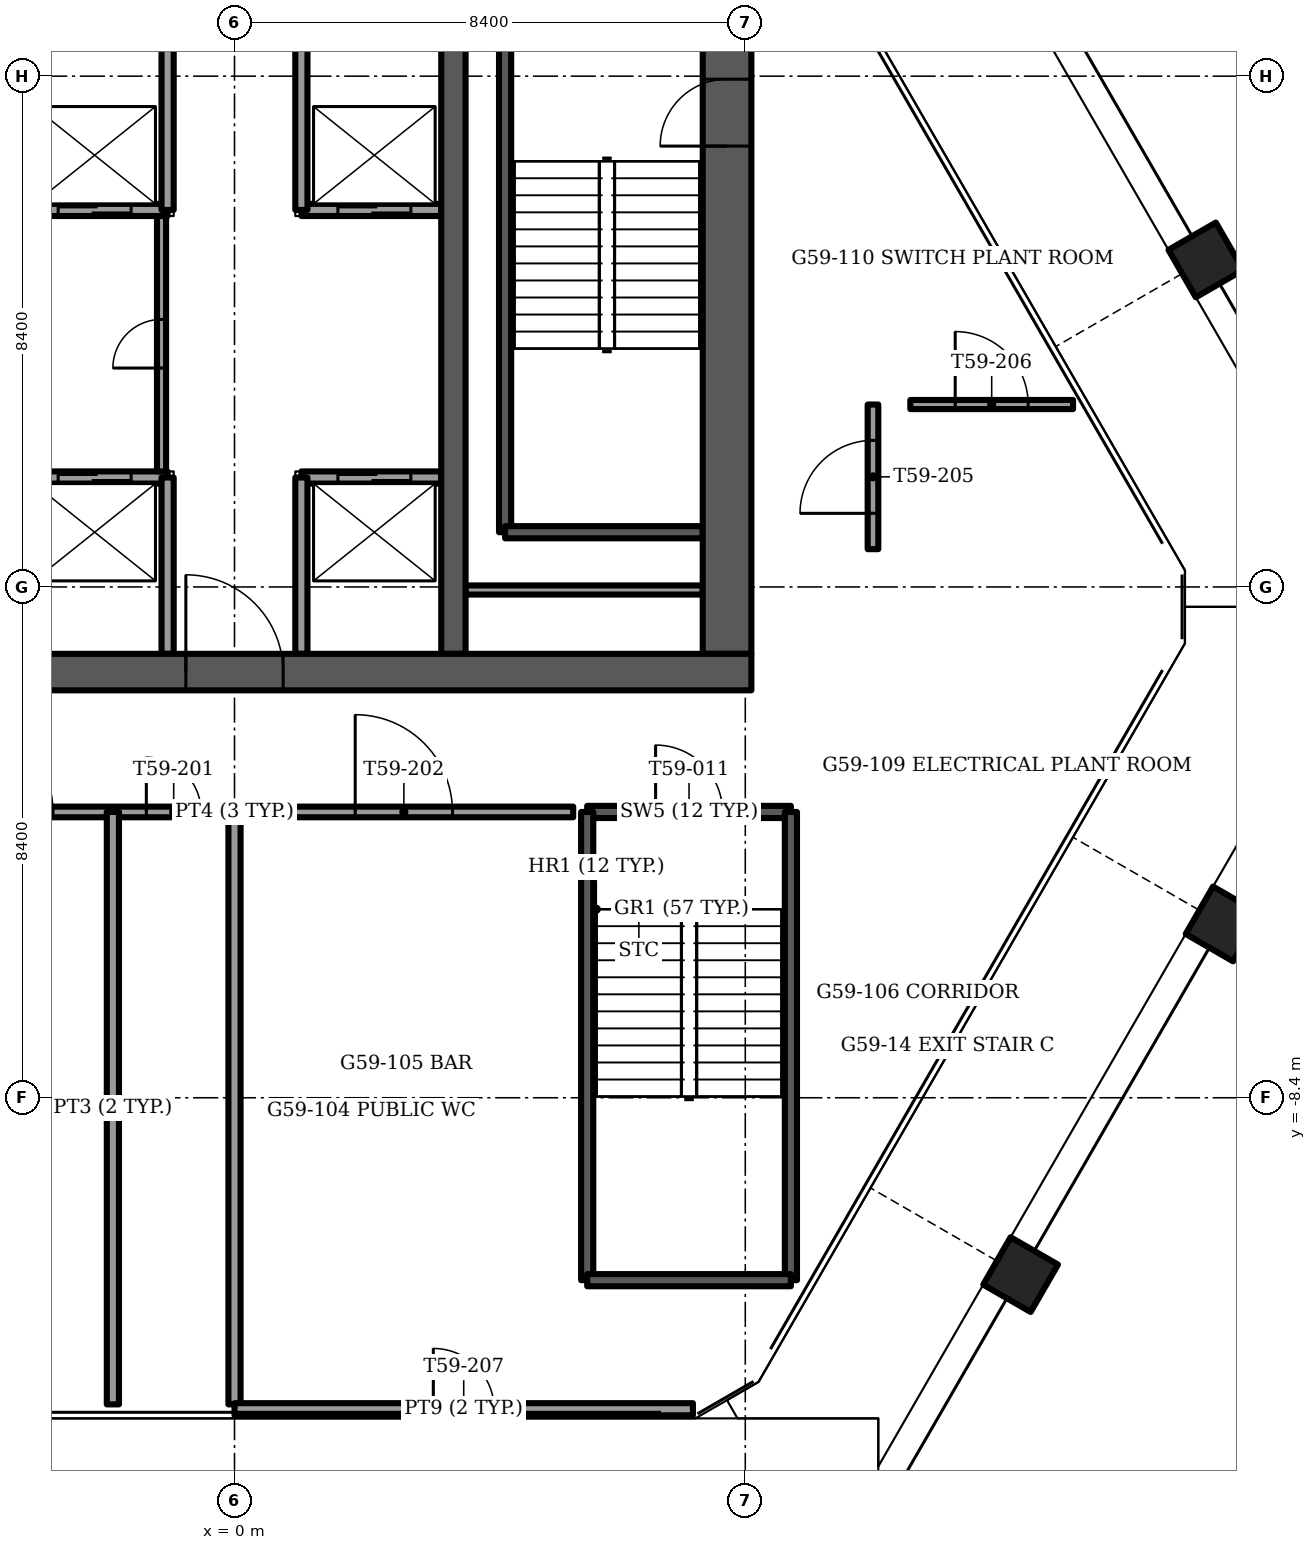
"""IFC4 building model, lengths in metres.
Left out: names, types, materials, properties, quantities, classifications, styles, units other than length and angle.
Written with IfcOpenShell. Run it as: python <this file> out.ifc"""

import sys

from ifc_helpers import new_model, si_unit, direction, frame, frame_2d, origin, origin_2d, place, context, subcontext, project, spatial, rectangle, extrude, element, fill, save


model = new_model("IFC4")
c1 = context("Model", 3, precision=1e-05, world=origin(), true_north=direction((0.0, 1.0)))
c2 = subcontext(c1, "Body", "Model", "MODEL_VIEW")
j1 = project(units=[si_unit("LENGTHUNIT", "METRE"), si_unit("PLANEANGLEUNIT", "RADIAN")], contexts=[c1])
p1 = place(None, origin())
s1 = spatial("IfcSite", under=j1, at=p1, CompositionType="ELEMENT")
p2 = place(p1, origin())
s2 = spatial("IfcBuilding", under=s1, at=p2, CompositionType="ELEMENT")
p3 = place(p2, frame((0.0, 0.0, 237.0)))
s3 = spatial("IfcBuildingStorey", under=s2, at=p3, CompositionType="ELEMENT", Elevation=237.0)
for number, where, z_axis, x_axis in (
    (1, (12.928, -11.308, -1.2), (0.0, 0.0, 1.0), (-0.5, -0.866, 0.0)),
    (2, (16.257, -5.542, -1.2), (0.0, 0.0, 1.0), (-0.5, -0.866, 0.0)),
    (3, (15.974, 5.378, -1.2), (0.0, 0.0, 1.0), (0.5, -0.866, 0.0)),
):
    element("IfcColumn", number, at=place(p3, frame(where, z_axis=z_axis, x_axis=x_axis)), inside=s3, PredefinedType="COLUMN", context=c2, shape_type="SweptSolid", body=[
        extrude(rectangle(XDim=0.9, YDim=0.9, at=origin_2d()), origin(), (0.0, 0.0, 1.0), 8.0),
    ])
p4 = place(p3, frame((-8.5, -1.4, -0.3), z_axis=(0.0, 0.0, 1.0), x_axis=(1.0, 0.0, 0.0)))
e4 = element("IfcWall", 4, at=p4, inside=s3, PredefinedType="SHEAR", context=c2, shape_type="SweptSolid", body=[
    extrude(rectangle(XDim=17.0, YDim=0.6, at=frame_2d((8.5, 0.0))), origin(), (0.0, 0.0, 1.0), 8.0),
])
p5 = place(p4, frame((7.7, 0.0, 0.0)))
e5 = element("IfcOpeningElement", 5, at=p5, cuts=e4, PredefinedType="OPENING", context=c2, shape_type="SweptSolid", body=[
    extrude(rectangle(XDim=1.6, YDim=2.1, at=frame_2d((0.8, 1.05))), frame((0.0, 0.3, 0.0), z_axis=(0.0, -1.0, 0.0), x_axis=(1.0, 0.0, 0.0)), (0.0, 0.0, 1.0), 0.6),
])
p6 = place(p3, frame((8.1, -1.1, -0.3), z_axis=(0.0, 0.0, 1.0), x_axis=(0.0, 1.0, 0.0)))
e6 = element("IfcWall", 6, at=p6, inside=s3, PredefinedType="SHEAR", context=c2, shape_type="SweptSolid", body=[
    extrude(rectangle(XDim=10.2, YDim=0.8, at=frame_2d((5.1, 0.0))), origin(), (0.0, 0.0, 1.0), 8.0),
])
p7 = place(p6, frame((8.35, 0.0, 0.0)))
e7 = element("IfcOpeningElement", 7, at=p7, cuts=e6, PredefinedType="OPENING", context=c2, shape_type="SweptSolid", body=[
    extrude(rectangle(XDim=1.1, YDim=2.1, at=frame_2d((0.55, 1.05))), frame((0.0, 0.4, 0.0), z_axis=(0.0, -1.0, 0.0), x_axis=(1.0, 0.0, 0.0)), (0.0, 0.0, 1.0), 0.8),
])
p8 = place(p3, frame((3.6, -1.1, -0.3), z_axis=(0.0, 0.0, 1.0), x_axis=(0.0, 1.0, 0.0)))
e8 = element("IfcWall", 8, at=p8, inside=s3, PredefinedType="SHEAR", context=c2, shape_type="SweptSolid", body=[
    extrude(rectangle(XDim=10.2, YDim=0.4, at=frame_2d((5.1, 0.0))), origin(), (0.0, 0.0, 1.0), 8.0),
])
p9 = place(p3, frame((-3.4, 1.8, 0.0), z_axis=(0.0, 0.0, 1.0), x_axis=(1.0, 0.0, 0.0)))
e9 = element("IfcWall", 9, at=p9, inside=s3, PredefinedType="PARTITIONING", context=c2, shape_type="SweptSolid", body=[
    extrude(rectangle(XDim=2.3, YDim=0.2, at=frame_2d((1.15, 0.0))), origin(), (0.0, 0.0, 1.0), 7.7),
])
p10 = place(p9, frame((0.5, 0.0, 0.0)))
e10 = element("IfcOpeningElement", 10, at=p10, cuts=e9, PredefinedType="OPENING", context=c2, shape_type="SweptSolid", body=[
    extrude(rectangle(XDim=1.2, YDim=2.1, at=frame_2d((0.6, 1.05))), frame((0.0, 0.1, 0.0), z_axis=(0.0, -1.0, 0.0), x_axis=(1.0, 0.0, 0.0)), (0.0, 0.0, 1.0), 0.2),
])
p11 = place(p3, frame((-3.4, 6.2, 0.0), z_axis=(0.0, 0.0, 1.0), x_axis=(1.0, 0.0, 0.0)))
e11 = element("IfcWall", 11, at=p11, inside=s3, PredefinedType="PARTITIONING", context=c2, shape_type="SweptSolid", body=[
    extrude(rectangle(XDim=2.3, YDim=0.2, at=frame_2d((1.15, 0.0))), origin(), (0.0, 0.0, 1.0), 7.7),
])
p12 = place(p11, frame((0.5, 0.0, 0.0)))
e12 = element("IfcOpeningElement", 12, at=p12, cuts=e11, PredefinedType="OPENING", context=c2, shape_type="SweptSolid", body=[
    extrude(rectangle(XDim=1.2, YDim=2.1, at=frame_2d((0.6, 1.05))), frame((0.0, 0.1, 0.0), z_axis=(0.0, -1.0, 0.0), x_axis=(1.0, 0.0, 0.0)), (0.0, 0.0, 1.0), 0.2),
])
p13 = place(p3, frame((1.1, 1.8, 0.0), z_axis=(0.0, 0.0, 1.0), x_axis=(1.0, 0.0, 0.0)))
e13 = element("IfcWall", 13, at=p13, inside=s3, PredefinedType="PARTITIONING", context=c2, shape_type="SweptSolid", body=[
    extrude(rectangle(XDim=2.3, YDim=0.2, at=frame_2d((1.15, 0.0))), origin(), (0.0, 0.0, 1.0), 7.7),
])
p14 = place(p13, frame((0.6, 0.0, 0.0)))
e14 = element("IfcOpeningElement", 14, at=p14, cuts=e13, PredefinedType="OPENING", context=c2, shape_type="SweptSolid", body=[
    extrude(rectangle(XDim=1.2, YDim=2.1, at=frame_2d((0.6, 1.05))), frame((0.0, 0.1, 0.0), z_axis=(0.0, -1.0, 0.0), x_axis=(1.0, 0.0, 0.0)), (0.0, 0.0, 1.0), 0.2),
])
p15 = place(p3, frame((1.1, 6.2, 0.0), z_axis=(0.0, 0.0, 1.0), x_axis=(1.0, 0.0, 0.0)))
e15 = element("IfcWall", 15, at=p15, inside=s3, PredefinedType="PARTITIONING", context=c2, shape_type="SweptSolid", body=[
    extrude(rectangle(XDim=2.3, YDim=0.2, at=frame_2d((1.15, 0.0))), origin(), (0.0, 0.0, 1.0), 7.7),
])
p16 = place(p15, frame((0.6, 0.0, 0.0)))
e16 = element("IfcOpeningElement", 16, at=p16, cuts=e15, PredefinedType="OPENING", context=c2, shape_type="SweptSolid", body=[
    extrude(rectangle(XDim=1.2, YDim=2.1, at=frame_2d((0.6, 1.05))), frame((0.0, 0.1, 0.0), z_axis=(0.0, -1.0, 0.0), x_axis=(1.0, 0.0, 0.0)), (0.0, 0.0, 1.0), 0.2),
])
for number, where, z_axis, x_axis in (
    (17, (-1.1, -1.1, 0.0), (0.0, 0.0, 1.0), (0.0, 1.0, 0.0)),
    (18, (1.1, -1.1, 0.0), (0.0, 0.0, 1.0), (0.0, 1.0, 0.0)),
    (19, (-1.1, 6.2, 0.0), (0.0, 0.0, 1.0), (0.0, 1.0, 0.0)),
    (20, (1.1, 6.2, 0.0), (0.0, 0.0, 1.0), (0.0, 1.0, 0.0)),
):
    element("IfcWall", number, at=place(p3, frame(where, z_axis=z_axis, x_axis=x_axis)), inside=s3, PredefinedType="PARTITIONING", context=c2, shape_type="SweptSolid", body=[
        extrude(rectangle(XDim=2.9, YDim=0.2, at=frame_2d((1.45, 0.0))), origin(), (0.0, 0.0, 1.0), 7.7),
    ])
p17 = place(p3, frame((4.45, 0.9, -0.3), z_axis=(0.0, 0.0, 1.0), x_axis=(0.0, 1.0, 0.0)))
e21 = element("IfcWall", 21, at=p17, inside=s3, PredefinedType="SOLIDWALL", context=c2, shape_type="SweptSolid", body=[
    extrude(rectangle(XDim=8.2, YDim=0.2, at=frame_2d((4.1, 0.0))), origin(), (0.0, 0.0, 1.0), 8.0),
])
p18 = place(p3, frame((4.45, 0.9, -0.3), z_axis=(0.0, 0.0, 1.0), x_axis=(1.0, 0.0, 0.0)))
e22 = element("IfcWall", 22, at=p18, inside=s3, PredefinedType="SOLIDWALL", context=c2, shape_type="SweptSolid", body=[
    extrude(rectangle(XDim=3.25, YDim=0.2, at=frame_2d((1.625, 0.0))), origin(), (0.0, 0.0, 1.0), 8.0),
])
p19 = place(p3, frame((3.8, -0.05, 0.0), z_axis=(0.0, 0.0, 1.0), x_axis=(1.0, 0.0, 0.0)))
e23 = element("IfcWall", 23, at=p19, inside=s3, PredefinedType="PARTITIONING", context=c2, shape_type="SweptSolid", body=[
    extrude(rectangle(XDim=3.9, YDim=0.15, at=frame_2d((1.95, 0.0))), origin(), (0.0, 0.0, 1.0), 7.7),
])
p20 = place(p3, frame((5.8, -3.7, -0.3), z_axis=(0.0, 0.0, 1.0), x_axis=(1.0, 0.0, 0.0)))
e24 = element("IfcWall", 24, at=p20, inside=s3, PredefinedType="SOLIDWALL", context=c2, shape_type="SweptSolid", body=[
    extrude(rectangle(XDim=3.35, YDim=0.2, at=frame_2d((1.675, 0.0))), origin(), (0.0, 0.0, 1.0), 8.0),
])
p21 = place(p20, frame((1.125, 0.0, 0.0)))
e25 = element("IfcOpeningElement", 25, at=p21, cuts=e24, PredefinedType="OPENING", context=c2, shape_type="SweptSolid", body=[
    extrude(rectangle(XDim=1.1, YDim=2.1, at=frame_2d((0.55, 1.05))), frame((0.0, 0.1, 0.0), z_axis=(0.0, -1.0, 0.0), x_axis=(1.0, 0.0, 0.0)), (0.0, 0.0, 1.0), 0.2),
])
for number, where, z_axis, x_axis in (
    (26, (5.8, -3.7, -0.3), (0.0, 0.0, 1.0), (0.0, -1.0, 0.0)),
    (27, (9.15, -3.7, -0.3), (0.0, 0.0, 1.0), (0.0, -1.0, 0.0)),
):
    element("IfcWall", number, at=place(p3, frame(where, z_axis=z_axis, x_axis=x_axis)), inside=s3, PredefinedType="SOLIDWALL", context=c2, shape_type="SweptSolid", body=[
        extrude(rectangle(XDim=7.7, YDim=0.2, at=frame_2d((3.85, 0.0))), origin(), (0.0, 0.0, 1.0), 8.0),
    ])
p22 = place(p3, frame((5.8, -11.4, -0.3), z_axis=(0.0, 0.0, 1.0), x_axis=(1.0, 0.0, 0.0)))
e28 = element("IfcWall", 28, at=p22, inside=s3, PredefinedType="SOLIDWALL", context=c2, shape_type="SweptSolid", body=[
    extrude(rectangle(XDim=3.35, YDim=0.2, at=frame_2d((1.675, 0.0))), origin(), (0.0, 0.0, 1.0), 8.0),
])
p23 = place(p3, frame((-1.2, 1.9, 0.0), z_axis=(0.0, 0.0, 1.0), x_axis=(0.0, 1.0, 0.0)))
e29 = element("IfcWall", 29, at=p23, inside=s3, PredefinedType="PARTITIONING", context=c2, shape_type="SweptSolid", body=[
    extrude(rectangle(XDim=4.2, YDim=0.15, at=frame_2d((2.1, 0.0))), origin(), (0.0, 0.0, 1.0), 7.7),
])
p24 = place(p23, frame((1.7, 0.0, 0.0)))
e30 = element("IfcOpeningElement", 30, at=p24, cuts=e29, PredefinedType="OPENING", context=c2, shape_type="SweptSolid", body=[
    extrude(rectangle(XDim=0.8, YDim=2.1, at=frame_2d((0.4, 1.05))), frame((0.0, 0.075, 0.0), z_axis=(0.0, -1.0, 0.0), x_axis=(1.0, 0.0, 0.0)), (0.0, 0.0, 1.0), 0.15),
])
p25 = place(p3, frame((-5.57, -3.7, 0.0), z_axis=(0.0, 0.0, 1.0), x_axis=(1.0, 0.0, 0.0)))
e31 = element("IfcWall", 31, at=p25, inside=s3, PredefinedType="PARTITIONING", context=c2, shape_type="SweptSolid", body=[
    extrude(rectangle(XDim=11.14, YDim=0.175, at=frame_2d((5.57, 0.0))), origin(), (0.0, 0.0, 1.0), 7.7),
])
p26 = place(p25, frame((0.985, 0.0, 0.0)))
e32 = element("IfcOpeningElement", 32, at=p26, cuts=e31, PredefinedType="OPENING", context=c2, shape_type="SweptSolid", body=[
    extrude(rectangle(XDim=1.6, YDim=2.1, at=frame_2d((0.8, 1.05))), frame((0.0, 0.087, 0.0), z_axis=(0.0, -1.0, 0.0), x_axis=(1.0, 0.0, 0.0)), (0.0, 0.0, 1.0), 0.175),
])
p27 = place(p25, frame((4.12, 0.0, 0.0)))
e33 = element("IfcOpeningElement", 33, at=p27, cuts=e31, PredefinedType="OPENING", context=c2, shape_type="SweptSolid", body=[
    extrude(rectangle(XDim=0.9, YDim=2.1, at=frame_2d((0.45, 1.05))), frame((0.0, 0.087, 0.0), z_axis=(0.0, -1.0, 0.0), x_axis=(1.0, 0.0, 0.0)), (0.0, 0.0, 1.0), 0.175),
])
p28 = place(p25, frame((7.555, 0.0, 0.0)))
e34 = element("IfcOpeningElement", 34, at=p28, cuts=e31, PredefinedType="OPENING", context=c2, shape_type="SweptSolid", body=[
    extrude(rectangle(XDim=1.6, YDim=2.1, at=frame_2d((0.8, 1.05))), frame((0.0, 0.087, 0.0), z_axis=(0.0, -1.0, 0.0), x_axis=(1.0, 0.0, 0.0)), (0.0, 0.0, 1.0), 0.175),
])
p29 = place(p3, frame((10.5, 0.621, 0.0), z_axis=(0.0, 0.0, 1.0), x_axis=(0.0, 1.0, 0.0)))
e35 = element("IfcWall", 35, at=p29, inside=s3, PredefinedType="PARTITIONING", context=c2, shape_type="SweptSolid", body=[
    extrude(rectangle(XDim=2.379, YDim=0.175, at=frame_2d((1.189, 0.0))), origin(), (0.0, 0.0, 1.0), 7.7),
])
p30 = place(p29, frame((0.589, 0.0, 0.0)))
e36 = element("IfcOpeningElement", 36, at=p30, cuts=e35, PredefinedType="OPENING", context=c2, shape_type="SweptSolid", body=[
    extrude(rectangle(XDim=1.2, YDim=2.1, at=frame_2d((0.6, 1.05))), frame((0.0, 0.087, 0.0), z_axis=(0.0, -1.0, 0.0), x_axis=(1.0, 0.0, 0.0)), (0.0, 0.0, 1.0), 0.175),
])
p31 = place(p3, frame((-2.0, -13.443, 0.0), z_axis=(0.0, 0.0, 1.0), x_axis=(0.0, 1.0, 0.0)))
e37 = element("IfcWall", 37, at=p31, inside=s3, PredefinedType="PARTITIONING", context=c2, shape_type="SweptSolid", body=[
    extrude(rectangle(XDim=9.743, YDim=0.2, at=frame_2d((4.871, 0.0))), origin(), (0.0, 0.0, 1.0), 7.7),
])
p32 = place(p3, frame((0.0, -13.443, 0.0), z_axis=(0.0, 0.0, 1.0), x_axis=(0.0, 1.0, 0.0)))
e38 = element("IfcWall", 38, at=p32, inside=s3, PredefinedType="PARTITIONING", context=c2, shape_type="SweptSolid", body=[
    extrude(rectangle(XDim=9.742, YDim=0.2, at=frame_2d((4.871, 0.0))), origin(), (0.0, 0.0, 1.0), 7.7),
])
p33 = place(p3, frame((11.114, 3.0, 0.0), z_axis=(0.0, 0.0, 1.0), x_axis=(1.0, 0.0, 0.0)))
e39 = element("IfcWall", 39, at=p33, inside=s3, PredefinedType="PARTITIONING", context=c2, shape_type="SweptSolid", body=[
    extrude(rectangle(XDim=2.676, YDim=0.15, at=frame_2d((1.338, 0.0))), origin(), (0.0, 0.0, 1.0), 7.7),
])
p34 = place(p33, frame((0.738, 0.0, 0.0)))
e40 = element("IfcOpeningElement", 40, at=p34, cuts=e39, PredefinedType="OPENING", context=c2, shape_type="SweptSolid", body=[
    extrude(rectangle(XDim=1.2, YDim=2.1, at=frame_2d((0.6, 1.05))), frame((0.0, 0.075, 0.0), z_axis=(0.0, -1.0, 0.0), x_axis=(1.0, 0.0, 0.0)), (0.0, 0.0, 1.0), 0.15),
])
p35 = place(p3, frame((0.0, -13.523, 0.0), z_axis=(0.0, 0.0, 1.0), x_axis=(1.0, 0.0, 0.0)))
e41 = element("IfcWall", 41, at=p35, inside=s3, PredefinedType="PARTITIONING", context=c2, shape_type="SweptSolid", body=[
    extrude(rectangle(XDim=7.539, YDim=0.2, at=frame_2d((3.77, 0.0))), origin(), (0.0, 0.0, 1.0), 7.7),
])
p36 = place(p35, frame((3.269, 0.0, 0.0)))
e42 = element("IfcOpeningElement", 42, at=p36, cuts=e41, PredefinedType="OPENING", context=c2, shape_type="SweptSolid", body=[
    extrude(rectangle(XDim=1.0, YDim=2.1, at=frame_2d((0.5, 1.05))), frame((0.0, 0.1, 0.0), z_axis=(0.0, -1.0, 0.0), x_axis=(1.0, 0.0, 0.0)), (0.0, 0.0, 1.0), 0.2),
])
p37 = place(p10, origin())
e43 = element("IfcDoor", 43, at=p37, inside=s3, OperationType="SLIDING_TO_LEFT", PredefinedType="DOOR", context=c2, shape_type="SweptSolid", body=[
    extrude(rectangle(XDim=1.2, YDim=2.1, at=frame_2d((0.6, 1.05))), frame((0.0, 0.025, 0.0), z_axis=(0.0, -1.0, 0.0), x_axis=(1.0, 0.0, 0.0)), (0.0, 0.0, 1.0), 0.05),
])
fill(e10, e43)
p38 = place(p14, origin())
e44 = element("IfcDoor", 44, at=p38, inside=s3, OperationType="SLIDING_TO_LEFT", PredefinedType="DOOR", context=c2, shape_type="SweptSolid", body=[
    extrude(rectangle(XDim=1.2, YDim=2.1, at=frame_2d((0.6, 1.05))), frame((0.0, 0.025, 0.0), z_axis=(0.0, -1.0, 0.0), x_axis=(1.0, 0.0, 0.0)), (0.0, 0.0, 1.0), 0.05),
])
fill(e14, e44)
p39 = place(p12, origin())
e45 = element("IfcDoor", 45, at=p39, inside=s3, OperationType="SLIDING_TO_LEFT", PredefinedType="DOOR", context=c2, shape_type="SweptSolid", body=[
    extrude(rectangle(XDim=1.2, YDim=2.1, at=frame_2d((0.6, 1.05))), frame((0.0, 0.025, 0.0), z_axis=(0.0, -1.0, 0.0), x_axis=(1.0, 0.0, 0.0)), (0.0, 0.0, 1.0), 0.05),
])
fill(e12, e45)
p40 = place(p16, origin())
e46 = element("IfcDoor", 46, at=p40, inside=s3, OperationType="SLIDING_TO_LEFT", PredefinedType="DOOR", context=c2, shape_type="SweptSolid", body=[
    extrude(rectangle(XDim=1.2, YDim=2.1, at=frame_2d((0.6, 1.05))), frame((0.0, 0.025, 0.0), z_axis=(0.0, -1.0, 0.0), x_axis=(1.0, 0.0, 0.0)), (0.0, 0.0, 1.0), 0.05),
])
fill(e16, e46)
p41 = place(p5, origin())
e47 = element("IfcDoor", 47, at=p41, inside=s3, OperationType="DOUBLE_DOOR_SINGLE_SWING", PredefinedType="DOOR", context=c2, shape_type="SweptSolid", body=[
    extrude(rectangle(XDim=1.6, YDim=2.1, at=frame_2d((0.8, 1.05))), frame((0.0, 0.025, 0.0), z_axis=(0.0, -1.0, 0.0), x_axis=(1.0, 0.0, 0.0)), (0.0, 0.0, 1.0), 0.05),
])
fill(e5, e47)
p42 = place(p7, origin())
e48 = element("IfcDoor", 48, at=p42, inside=s3, OperationType="SINGLE_SWING_LEFT", PredefinedType="DOOR", context=c2, shape_type="SweptSolid", body=[
    extrude(rectangle(XDim=1.1, YDim=2.1, at=frame_2d((0.55, 1.05))), frame((0.0, 0.025, 0.0), z_axis=(0.0, -1.0, 0.0), x_axis=(1.0, 0.0, 0.0)), (0.0, 0.0, 1.0), 0.05),
])
fill(e7, e48)
p43 = place(p21, origin())
e49 = element("IfcDoor", 49, at=p43, inside=s3, OperationType="SINGLE_SWING_LEFT", PredefinedType="DOOR", context=c2, shape_type="SweptSolid", body=[
    extrude(rectangle(XDim=1.1, YDim=2.1, at=frame_2d((0.55, 1.05))), frame((0.0, 0.025, 0.0), z_axis=(0.0, -1.0, 0.0), x_axis=(1.0, 0.0, 0.0)), (0.0, 0.0, 1.0), 0.05),
])
fill(e25, e49)
p44 = place(p24, origin())
e50 = element("IfcDoor", 50, at=p44, inside=s3, OperationType="SINGLE_SWING_LEFT", PredefinedType="DOOR", context=c2, shape_type="SweptSolid", body=[
    extrude(rectangle(XDim=0.8, YDim=2.1, at=frame_2d((0.4, 1.05))), frame((0.0, 0.025, 0.0), z_axis=(0.0, -1.0, 0.0), x_axis=(1.0, 0.0, 0.0)), (0.0, 0.0, 1.0), 0.05),
])
fill(e30, e50)
p45 = place(p26, origin())
e51 = element("IfcDoor", 51, at=p45, inside=s3, OperationType="DOUBLE_DOOR_SINGLE_SWING", PredefinedType="DOOR", context=c2, shape_type="SweptSolid", body=[
    extrude(rectangle(XDim=1.6, YDim=2.1, at=frame_2d((0.8, 1.05))), frame((0.0, 0.025, 0.0), z_axis=(0.0, -1.0, 0.0), x_axis=(1.0, 0.0, 0.0)), (0.0, 0.0, 1.0), 0.05),
])
fill(e32, e51)
p46 = place(p27, origin())
e52 = element("IfcDoor", 52, at=p46, inside=s3, OperationType="SINGLE_SWING_LEFT", PredefinedType="DOOR", context=c2, shape_type="SweptSolid", body=[
    extrude(rectangle(XDim=0.9, YDim=2.1, at=frame_2d((0.45, 1.05))), frame((0.0, 0.025, 0.0), z_axis=(0.0, -1.0, 0.0), x_axis=(1.0, 0.0, 0.0)), (0.0, 0.0, 1.0), 0.05),
])
fill(e33, e52)
p47 = place(p28, origin())
e53 = element("IfcDoor", 53, at=p47, inside=s3, OperationType="DOUBLE_DOOR_SINGLE_SWING", PredefinedType="DOOR", context=c2, shape_type="SweptSolid", body=[
    extrude(rectangle(XDim=1.6, YDim=2.1, at=frame_2d((0.8, 1.05))), frame((0.0, 0.025, 0.0), z_axis=(0.0, -1.0, 0.0), x_axis=(1.0, 0.0, 0.0)), (0.0, 0.0, 1.0), 0.05),
])
fill(e34, e53)
p48 = place(p30, origin())
e54 = element("IfcDoor", 54, at=p48, inside=s3, OperationType="SINGLE_SWING_LEFT", PredefinedType="DOOR", context=c2, shape_type="SweptSolid", body=[
    extrude(rectangle(XDim=1.2, YDim=2.1, at=frame_2d((0.6, 1.05))), frame((0.0, 0.025, 0.0), z_axis=(0.0, -1.0, 0.0), x_axis=(1.0, 0.0, 0.0)), (0.0, 0.0, 1.0), 0.05),
])
fill(e36, e54)
p49 = place(p34, origin())
e55 = element("IfcDoor", 55, at=p49, inside=s3, OperationType="SINGLE_SWING_RIGHT", PredefinedType="DOOR", context=c2, shape_type="SweptSolid", body=[
    extrude(rectangle(XDim=1.2, YDim=2.1, at=frame_2d((0.6, 1.05))), frame((0.0, 0.025, 0.0), z_axis=(0.0, -1.0, 0.0), x_axis=(1.0, 0.0, 0.0)), (0.0, 0.0, 1.0), 0.05),
])
fill(e40, e55)
p50 = place(p36, origin())
e56 = element("IfcDoor", 56, at=p50, inside=s3, OperationType="SINGLE_SWING_LEFT", PredefinedType="DOOR", context=c2, shape_type="SweptSolid", body=[
    extrude(rectangle(XDim=1.0, YDim=2.1, at=frame_2d((0.5, 1.05))), frame((0.0, 0.025, 0.0), z_axis=(0.0, -1.0, 0.0), x_axis=(1.0, 0.0, 0.0)), (0.0, 0.0, 1.0), 0.05),
])
fill(e42, e56)
save(model, sys.argv[1])
